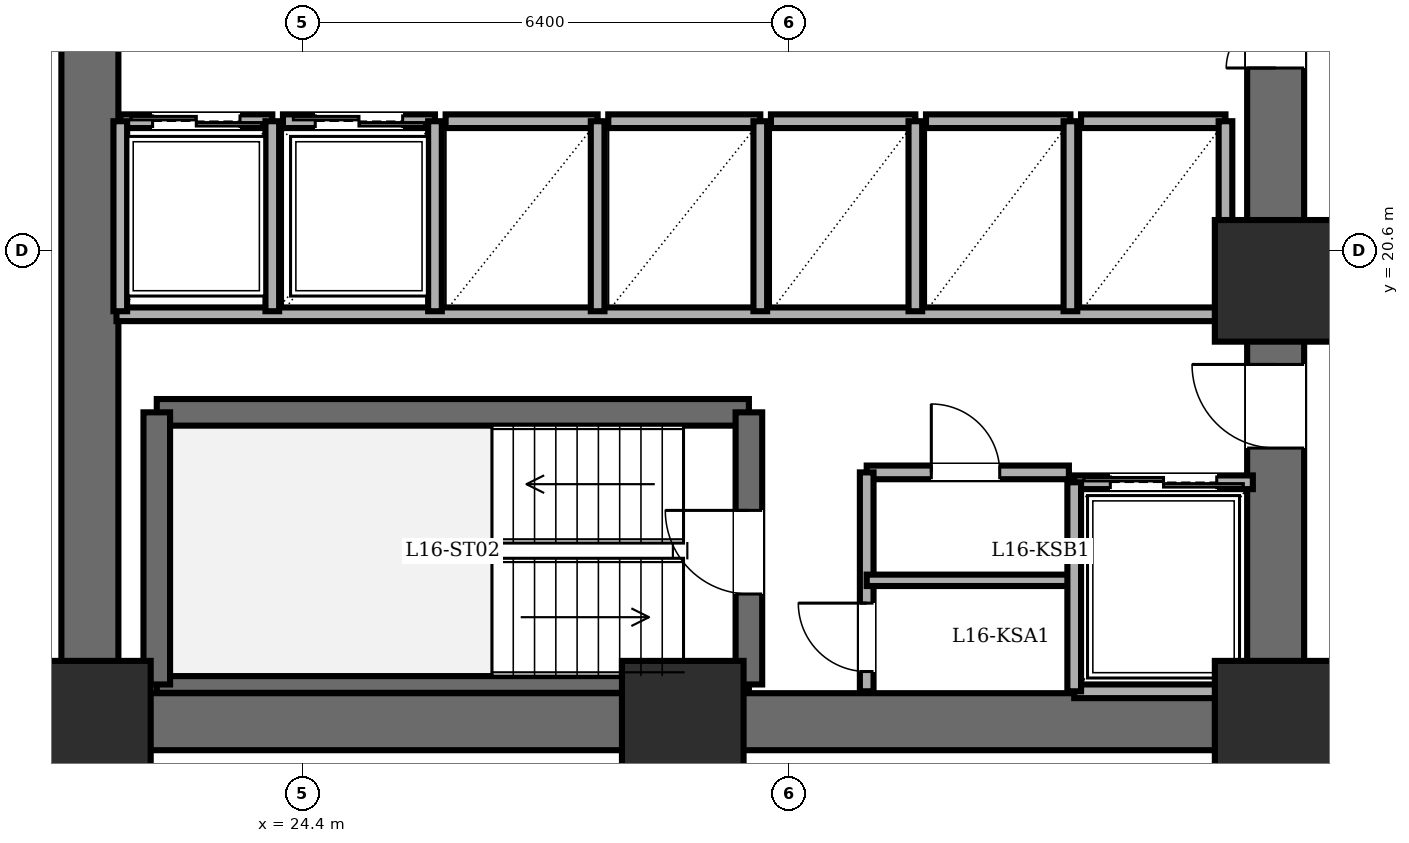
"""IFC4 building model, lengths in metres.
Left out: names, types, materials, properties, quantities, classifications, styles, units other than length and angle.
Written with IfcOpenShell. Run it as: python <this file> out.ifc"""

import sys

from ifc_helpers import new_model, si_unit, direction, frame, frame_2d, origin, origin_2d, place, context, subcontext, project, spatial, rectangle, extrude, element, fill, save


model = new_model("IFC4")
c1 = context("Model", 3, precision=1e-05, world=origin(), true_north=direction((0.0, 1.0)))
c2 = subcontext(c1, "Body", "Model", "MODEL_VIEW")
j1 = project(units=[si_unit("LENGTHUNIT", "METRE"), si_unit("PLANEANGLEUNIT", "RADIAN")], contexts=[c1])
p1 = place(None, origin())
s1 = spatial("IfcSite", under=j1, at=p1, CompositionType="ELEMENT")
p2 = place(p1, origin())
s2 = spatial("IfcBuilding", under=s1, at=p2, CompositionType="ELEMENT")
p3 = place(p2, frame((0.0, 0.0, 61.2)))
s3 = spatial("IfcBuildingStorey", under=s2, at=p3, CompositionType="ELEMENT", Elevation=61.2)
for number, where, z_axis, x_axis in (
    (1, (21.6, 14.4, 0.0), (0.0, 0.0, 1.0), (1.0, 0.0, 0.0)),
    (2, (29.4, 14.4, 0.0), (0.0, 0.0, 1.0), (1.0, 0.0, 0.0)),
    (3, (37.2, 14.4, 0.0), (0.0, 0.0, 1.0), (1.0, 0.0, 0.0)),
    (4, (37.2, 20.2, 0.0), (0.0, 0.0, 1.0), (1.0, 0.0, 0.0)),
):
    element("IfcColumn", number, at=place(p3, frame(where, z_axis=z_axis, x_axis=x_axis)), inside=s3, PredefinedType="COLUMN", context=c2, shape_type="SweptSolid", body=[
        extrude(rectangle(XDim=1.6, YDim=1.6, at=origin_2d()), origin(), (0.0, 0.0, 1.0), 3.6),
    ])
p4 = place(p3, frame((21.6, 14.4, 0.0), z_axis=(0.0, 0.0, 1.0), x_axis=(0.0, 1.0, 0.0)))
e5 = element("IfcWall", 5, at=p4, inside=s3, PredefinedType="SHEAR", context=c2, shape_type="SweptSolid", body=[
    extrude(rectangle(XDim=19.2, YDim=0.75, at=frame_2d((9.6, 0.0))), origin(), (0.0, 0.0, 1.0), 3.4),
])
p5 = place(p3, frame((37.2, 14.4, 0.0), z_axis=(0.0, 0.0, 1.0), x_axis=(-1.0, 0.0, 0.0)))
e6 = element("IfcWall", 6, at=p5, inside=s3, PredefinedType="SHEAR", context=c2, shape_type="SweptSolid", body=[
    extrude(rectangle(XDim=15.6, YDim=0.75, at=frame_2d((7.8, 0.0))), origin(), (0.0, 0.0, 1.0), 3.4),
])
p6 = place(p3, frame((37.2, 14.4, 0.0), z_axis=(0.0, 0.0, 1.0), x_axis=(0.0, 1.0, 0.0)))
e7 = element("IfcWall", 7, at=p6, inside=s3, PredefinedType="SHEAR", context=c2, shape_type="SweptSolid", body=[
    extrude(rectangle(XDim=19.2, YDim=0.75, at=frame_2d((9.6, 0.0))), origin(), (0.0, 0.0, 1.0), 3.4),
])
p7 = place(p6, frame((15.8, 0.0, 0.0)))
e8 = element("IfcOpeningElement", 8, at=p7, cuts=e7, PredefinedType="OPENING", context=c2, shape_type="SweptSolid", body=[
    extrude(rectangle(XDim=1.15, YDim=2.15, at=frame_2d((0.575, 1.075))), frame((0.0, 0.385, 0.0), z_axis=(0.0, -1.0, 0.0), x_axis=(1.0, 0.0, 0.0)), (0.0, 0.0, 1.0), 0.77),
])
p8 = place(p6, frame((3.6, 0.0, 0.0)))
e9 = element("IfcOpeningElement", 9, at=p8, cuts=e7, PredefinedType="OPENING", context=c2, shape_type="SweptSolid", body=[
    extrude(rectangle(XDim=1.1, YDim=2.15, at=frame_2d((0.55, 1.075))), frame((0.0, 0.385, 0.0), z_axis=(0.0, -1.0, 0.0), x_axis=(1.0, 0.0, 0.0)), (0.0, 0.0, 1.0), 0.77),
])
p9 = place(p6, frame((8.6, 0.0, 0.0)))
e10 = element("IfcOpeningElement", 10, at=p9, cuts=e7, PredefinedType="OPENING", context=c2, shape_type="SweptSolid", body=[
    extrude(rectangle(XDim=1.3, YDim=2.2, at=frame_2d((0.65, 1.1))), frame((0.0, 0.385, 0.0), z_axis=(0.0, -1.0, 0.0), x_axis=(1.0, 0.0, 0.0)), (0.0, 0.0, 1.0), 0.77),
])
p10 = place(p3, frame((22.48, 18.47, 0.0), z_axis=(0.0, 0.0, 1.0), x_axis=(1.0, 0.0, 0.0)))
e11 = element("IfcWall", 11, at=p10, inside=s3, PredefinedType="SOLIDWALL", context=c2, shape_type="SweptSolid", body=[
    extrude(rectangle(XDim=7.79, YDim=0.35, at=frame_2d((3.895, 0.0))), origin(), (0.0, 0.0, 1.0), 3.4),
])
p11 = place(p3, frame((22.48, 14.89, 0.0), z_axis=(0.0, 0.0, 1.0), x_axis=(1.0, 0.0, 0.0)))
e12 = element("IfcWall", 12, at=p11, inside=s3, PredefinedType="PARTITIONING", context=c2, shape_type="SweptSolid", body=[
    extrude(rectangle(XDim=7.79, YDim=0.22, at=frame_2d((3.895, 0.0))), origin(), (0.0, 0.0, 1.0), 3.4),
])
p12 = place(p3, frame((22.48, 14.89, 0.0), z_axis=(0.0, 0.0, 1.0), x_axis=(0.0, 1.0, 0.0)))
e13 = element("IfcWall", 13, at=p12, inside=s3, PredefinedType="SOLIDWALL", context=c2, shape_type="SweptSolid", body=[
    extrude(rectangle(XDim=3.58, YDim=0.35, at=frame_2d((1.79, 0.0))), origin(), (0.0, 0.0, 1.0), 3.4),
])
p13 = place(p3, frame((30.27, 14.89, 0.0), z_axis=(0.0, 0.0, 1.0), x_axis=(0.0, 1.0, 0.0)))
e14 = element("IfcWall", 14, at=p13, inside=s3, PredefinedType="SOLIDWALL", context=c2, shape_type="SweptSolid", body=[
    extrude(rectangle(XDim=3.58, YDim=0.35, at=frame_2d((1.79, 0.0))), origin(), (0.0, 0.0, 1.0), 3.4),
])
p14 = place(p13, frame((1.19, 0.0, 0.0)))
e15 = element("IfcOpeningElement", 15, at=p14, cuts=e14, PredefinedType="OPENING", context=c2, shape_type="SweptSolid", body=[
    extrude(rectangle(XDim=1.1, YDim=2.15, at=frame_2d((0.55, 1.075))), frame((0.0, 0.185, 0.0), z_axis=(0.0, -1.0, 0.0), x_axis=(1.0, 0.0, 0.0)), (0.0, 0.0, 1.0), 0.37),
])
p15 = place(p3, frame((21.95, 19.76, 0.0), z_axis=(0.0, 0.0, 1.0), x_axis=(1.0, 0.0, 0.0)))
e16 = element("IfcWall", 16, at=p15, inside=s3, PredefinedType="PARTITIONING", context=c2, shape_type="SweptSolid", body=[
    extrude(rectangle(XDim=14.87, YDim=0.18, at=frame_2d((7.435, 0.0))), origin(), (0.0, 0.0, 1.0), 3.4),
])
p16 = place(p3, frame((31.82, 17.68, 0.0), z_axis=(0.0, 0.0, 1.0), x_axis=(1.0, 0.0, 0.0)))
e17 = element("IfcWall", 17, at=p16, inside=s3, PredefinedType="PARTITIONING", context=c2, shape_type="SweptSolid", body=[
    extrude(rectangle(XDim=2.66, YDim=0.18, at=frame_2d((1.33, 0.0))), origin(), (0.0, 0.0, 1.0), 3.4),
])
p17 = place(p16, frame((0.85, 0.0, 0.0)))
e18 = element("IfcOpeningElement", 18, at=p17, cuts=e17, PredefinedType="OPENING", context=c2, shape_type="SweptSolid", body=[
    extrude(rectangle(XDim=0.9, YDim=2.05, at=frame_2d((0.45, 1.025))), frame((0.0, 0.1, 0.0), z_axis=(0.0, -1.0, 0.0), x_axis=(1.0, 0.0, 0.0)), (0.0, 0.0, 1.0), 0.2),
])
p18 = place(p3, frame((31.82, 14.8, 0.0), z_axis=(0.0, 0.0, 1.0), x_axis=(0.0, 1.0, 0.0)))
e19 = element("IfcWall", 19, at=p18, inside=s3, PredefinedType="PARTITIONING", context=c2, shape_type="SweptSolid", body=[
    extrude(rectangle(XDim=2.88, YDim=0.18, at=frame_2d((1.44, 0.0))), origin(), (0.0, 0.0, 1.0), 3.4),
])
p19 = place(p18, frame((0.26, 0.0, 0.0)))
e20 = element("IfcOpeningElement", 20, at=p19, cuts=e19, PredefinedType="OPENING", context=c2, shape_type="SweptSolid", body=[
    extrude(rectangle(XDim=0.9, YDim=2.05, at=frame_2d((0.45, 1.025))), frame((0.0, 0.1, 0.0), z_axis=(0.0, -1.0, 0.0), x_axis=(1.0, 0.0, 0.0)), (0.0, 0.0, 1.0), 0.2),
])
p20 = place(p3, frame((31.82, 16.26, 0.0), z_axis=(0.0, 0.0, 1.0), x_axis=(1.0, 0.0, 0.0)))
e21 = element("IfcWall", 21, at=p20, inside=s3, PredefinedType="PARTITIONING", context=c2, shape_type="SweptSolid", body=[
    extrude(rectangle(XDim=2.66, YDim=0.15, at=frame_2d((1.33, 0.0))), origin(), (0.0, 0.0, 1.0), 3.4),
])
p21 = place(p3, frame((34.55, 17.55, 0.0), z_axis=(0.0, 0.0, 1.0), x_axis=(1.0, 0.0, 0.0)))
e22 = element("IfcWall", 22, at=p21, inside=s3, PredefinedType="PARTITIONING", context=c2, shape_type="SweptSolid", body=[
    extrude(rectangle(XDim=2.35, YDim=0.18, at=frame_2d((1.175, 0.0))), origin(), (0.0, 0.0, 1.0), 3.4),
])
p22 = place(p21, frame((0.475, 0.0, 0.0)))
e23 = element("IfcOpeningElement", 23, at=p22, cuts=e22, PredefinedType="OPENING", context=c2, shape_type="SweptSolid", body=[
    extrude(rectangle(XDim=1.4, YDim=2.3, at=frame_2d((0.7, 1.15))), frame((0.0, 0.1, 0.0), z_axis=(0.0, -1.0, 0.0), x_axis=(1.0, 0.0, 0.0)), (0.0, 0.0, 1.0), 0.2),
])
p23 = place(p3, frame((36.9, 14.8, 0.0), z_axis=(0.0, 0.0, 1.0), x_axis=(-1.0, 0.0, 0.0)))
e24 = element("IfcWall", 24, at=p23, inside=s3, PredefinedType="PARTITIONING", context=c2, shape_type="SweptSolid", body=[
    extrude(rectangle(XDim=2.35, YDim=0.18, at=frame_2d((1.175, 0.0))), origin(), (0.0, 0.0, 1.0), 3.4),
])
p24 = place(p3, frame((34.55, 17.55, 0.0), z_axis=(0.0, 0.0, 1.0), x_axis=(0.0, -1.0, 0.0)))
e25 = element("IfcWall", 25, at=p24, inside=s3, PredefinedType="PARTITIONING", context=c2, shape_type="SweptSolid", body=[
    extrude(rectangle(XDim=2.75, YDim=0.18, at=frame_2d((1.375, 0.0))), origin(), (0.0, 0.0, 1.0), 3.4),
])
p25 = place(p3, frame((22.0, 22.3, 0.0), z_axis=(0.0, 0.0, 1.0), x_axis=(1.0, 0.0, 0.0)))
e26 = element("IfcWall", 26, at=p25, inside=s3, PredefinedType="PARTITIONING", context=c2, shape_type="SweptSolid", body=[
    extrude(rectangle(XDim=2.0, YDim=0.18, at=frame_2d((1.0, 0.0))), origin(), (0.0, 0.0, 1.0), 3.4),
])
p26 = place(p25, frame((0.425, 0.0, 0.0)))
e27 = element("IfcOpeningElement", 27, at=p26, cuts=e26, PredefinedType="OPENING", context=c2, shape_type="SweptSolid", body=[
    extrude(rectangle(XDim=1.15, YDim=2.2, at=frame_2d((0.575, 1.1))), frame((0.0, 0.1, 0.0), z_axis=(0.0, -1.0, 0.0), x_axis=(1.0, 0.0, 0.0)), (0.0, 0.0, 1.0), 0.2),
])
for number, where, z_axis, x_axis in (
    (28, (24.0, 19.8, 0.0), (0.0, 0.0, 1.0), (0.0, 1.0, 0.0)),
    (29, (22.0, 22.3, 0.0), (0.0, 0.0, 1.0), (0.0, -1.0, 0.0)),
):
    element("IfcWall", number, at=place(p3, frame(where, z_axis=z_axis, x_axis=x_axis)), inside=s3, PredefinedType="PARTITIONING", context=c2, shape_type="SweptSolid", body=[
        extrude(rectangle(XDim=2.5, YDim=0.18, at=frame_2d((1.25, 0.0))), origin(), (0.0, 0.0, 1.0), 3.4),
    ])
p27 = place(p3, frame((24.14, 22.3, 0.0), z_axis=(0.0, 0.0, 1.0), x_axis=(1.0, 0.0, 0.0)))
e30 = element("IfcWall", 30, at=p27, inside=s3, PredefinedType="PARTITIONING", context=c2, shape_type="SweptSolid", body=[
    extrude(rectangle(XDim=2.0, YDim=0.18, at=frame_2d((1.0, 0.0))), origin(), (0.0, 0.0, 1.0), 3.4),
])
p28 = place(p27, frame((0.425, 0.0, 0.0)))
e31 = element("IfcOpeningElement", 31, at=p28, cuts=e30, PredefinedType="OPENING", context=c2, shape_type="SweptSolid", body=[
    extrude(rectangle(XDim=1.15, YDim=2.2, at=frame_2d((0.575, 1.1))), frame((0.0, 0.1, 0.0), z_axis=(0.0, -1.0, 0.0), x_axis=(1.0, 0.0, 0.0)), (0.0, 0.0, 1.0), 0.2),
])
p29 = place(p3, frame((26.14, 19.8, 0.0), z_axis=(0.0, 0.0, 1.0), x_axis=(0.0, 1.0, 0.0)))
e32 = element("IfcWall", 32, at=p29, inside=s3, PredefinedType="PARTITIONING", context=c2, shape_type="SweptSolid", body=[
    extrude(rectangle(XDim=2.5, YDim=0.18, at=frame_2d((1.25, 0.0))), origin(), (0.0, 0.0, 1.0), 3.4),
])
p30 = place(p3, frame((26.28, 22.3, 0.0), z_axis=(0.0, 0.0, 1.0), x_axis=(1.0, 0.0, 0.0)))
e33 = element("IfcWall", 33, at=p30, inside=s3, PredefinedType="PARTITIONING", context=c2, shape_type="SweptSolid", body=[
    extrude(rectangle(XDim=2.0, YDim=0.18, at=frame_2d((1.0, 0.0))), origin(), (0.0, 0.0, 1.0), 3.4),
])
p31 = place(p3, frame((28.28, 19.8, 0.0), z_axis=(0.0, 0.0, 1.0), x_axis=(0.0, 1.0, 0.0)))
e34 = element("IfcWall", 34, at=p31, inside=s3, PredefinedType="PARTITIONING", context=c2, shape_type="SweptSolid", body=[
    extrude(rectangle(XDim=2.5, YDim=0.18, at=frame_2d((1.25, 0.0))), origin(), (0.0, 0.0, 1.0), 3.4),
])
p32 = place(p3, frame((28.42, 22.3, 0.0), z_axis=(0.0, 0.0, 1.0), x_axis=(1.0, 0.0, 0.0)))
e35 = element("IfcWall", 35, at=p32, inside=s3, PredefinedType="PARTITIONING", context=c2, shape_type="SweptSolid", body=[
    extrude(rectangle(XDim=2.0, YDim=0.18, at=frame_2d((1.0, 0.0))), origin(), (0.0, 0.0, 1.0), 3.4),
])
p33 = place(p3, frame((30.42, 19.8, 0.0), z_axis=(0.0, 0.0, 1.0), x_axis=(0.0, 1.0, 0.0)))
e36 = element("IfcWall", 36, at=p33, inside=s3, PredefinedType="PARTITIONING", context=c2, shape_type="SweptSolid", body=[
    extrude(rectangle(XDim=2.5, YDim=0.18, at=frame_2d((1.25, 0.0))), origin(), (0.0, 0.0, 1.0), 3.4),
])
p34 = place(p3, frame((30.56, 22.3, 0.0), z_axis=(0.0, 0.0, 1.0), x_axis=(1.0, 0.0, 0.0)))
e37 = element("IfcWall", 37, at=p34, inside=s3, PredefinedType="PARTITIONING", context=c2, shape_type="SweptSolid", body=[
    extrude(rectangle(XDim=1.9, YDim=0.18, at=frame_2d((0.95, 0.0))), origin(), (0.0, 0.0, 1.0), 3.4),
])
p35 = place(p3, frame((32.46, 19.8, 0.0), z_axis=(0.0, 0.0, 1.0), x_axis=(0.0, 1.0, 0.0)))
e38 = element("IfcWall", 38, at=p35, inside=s3, PredefinedType="PARTITIONING", context=c2, shape_type="SweptSolid", body=[
    extrude(rectangle(XDim=2.5, YDim=0.18, at=frame_2d((1.25, 0.0))), origin(), (0.0, 0.0, 1.0), 3.4),
])
p36 = place(p3, frame((32.6, 22.3, 0.0), z_axis=(0.0, 0.0, 1.0), x_axis=(1.0, 0.0, 0.0)))
e39 = element("IfcWall", 39, at=p36, inside=s3, PredefinedType="PARTITIONING", context=c2, shape_type="SweptSolid", body=[
    extrude(rectangle(XDim=1.9, YDim=0.18, at=frame_2d((0.95, 0.0))), origin(), (0.0, 0.0, 1.0), 3.4),
])
p37 = place(p3, frame((34.5, 19.8, 0.0), z_axis=(0.0, 0.0, 1.0), x_axis=(0.0, 1.0, 0.0)))
e40 = element("IfcWall", 40, at=p37, inside=s3, PredefinedType="PARTITIONING", context=c2, shape_type="SweptSolid", body=[
    extrude(rectangle(XDim=2.5, YDim=0.18, at=frame_2d((1.25, 0.0))), origin(), (0.0, 0.0, 1.0), 3.4),
])
p38 = place(p3, frame((34.64, 22.3, 0.0), z_axis=(0.0, 0.0, 1.0), x_axis=(1.0, 0.0, 0.0)))
e41 = element("IfcWall", 41, at=p38, inside=s3, PredefinedType="PARTITIONING", context=c2, shape_type="SweptSolid", body=[
    extrude(rectangle(XDim=1.9, YDim=0.18, at=frame_2d((0.95, 0.0))), origin(), (0.0, 0.0, 1.0), 3.4),
])
p39 = place(p3, frame((36.54, 19.8, 0.0), z_axis=(0.0, 0.0, 1.0), x_axis=(0.0, 1.0, 0.0)))
e42 = element("IfcWall", 42, at=p39, inside=s3, PredefinedType="PARTITIONING", context=c2, shape_type="SweptSolid", body=[
    extrude(rectangle(XDim=2.5, YDim=0.18, at=frame_2d((1.25, 0.0))), origin(), (0.0, 0.0, 1.0), 3.4),
])
p40 = place(p3, frame((3.4, 14.18, 0.0), z_axis=(0.0, 0.0, 1.0), x_axis=(1.0, 0.0, 0.0)))
e43 = element("IfcWall", 43, at=p40, inside=s3, PredefinedType="PARTITIONING", context=c2, shape_type="SweptSolid", body=[
    extrude(rectangle(XDim=18.08, YDim=0.22, at=frame_2d((9.04, 0.0))), origin(), (0.0, 0.0, 1.0), 3.4),
])
p41 = place(p40, frame((9.62, 0.0, 0.0)))
e44 = element("IfcOpeningElement", 44, at=p41, cuts=e43, PredefinedType="OPENING", context=c2, shape_type="SweptSolid", body=[
    extrude(rectangle(XDim=0.92, YDim=2.1, at=frame_2d((0.46, 1.05))), frame((0.0, 0.12, 0.0), z_axis=(0.0, -1.0, 0.0), x_axis=(1.0, 0.0, 0.0)), (0.0, 0.0, 1.0), 0.24),
])
p42 = place(p14, origin())
e45 = element("IfcDoor", 45, at=p42, inside=s3, OperationType="SINGLE_SWING_RIGHT", PredefinedType="DOOR", context=c2, shape_type="SweptSolid", body=[
    extrude(rectangle(XDim=1.1, YDim=2.15, at=frame_2d((0.55, 1.075))), frame((0.0, 0.025, 0.0), z_axis=(0.0, -1.0, 0.0), x_axis=(1.0, 0.0, 0.0)), (0.0, 0.0, 1.0), 0.05),
])
fill(e15, e45)
p43 = place(p8, origin())
e46 = element("IfcDoor", 46, at=p43, inside=s3, OperationType="SINGLE_SWING_RIGHT", PredefinedType="DOOR", context=c2, shape_type="SweptSolid", body=[
    extrude(rectangle(XDim=1.1, YDim=2.15, at=frame_2d((0.55, 1.075))), frame((0.0, 0.025, 0.0), z_axis=(0.0, -1.0, 0.0), x_axis=(1.0, 0.0, 0.0)), (0.0, 0.0, 1.0), 0.05),
])
fill(e9, e46)
p44 = place(p17, origin())
e47 = element("IfcDoor", 47, at=p44, inside=s3, OperationType="SINGLE_SWING_LEFT", PredefinedType="DOOR", context=c2, shape_type="SweptSolid", body=[
    extrude(rectangle(XDim=0.9, YDim=2.05, at=frame_2d((0.45, 1.025))), frame((0.0, 0.025, 0.0), z_axis=(0.0, -1.0, 0.0), x_axis=(1.0, 0.0, 0.0)), (0.0, 0.0, 1.0), 0.05),
])
fill(e18, e47)
p45 = place(p19, origin())
e48 = element("IfcDoor", 48, at=p45, inside=s3, OperationType="SINGLE_SWING_RIGHT", PredefinedType="DOOR", context=c2, shape_type="SweptSolid", body=[
    extrude(rectangle(XDim=0.9, YDim=2.05, at=frame_2d((0.45, 1.025))), frame((0.0, 0.025, 0.0), z_axis=(0.0, -1.0, 0.0), x_axis=(1.0, 0.0, 0.0)), (0.0, 0.0, 1.0), 0.05),
])
fill(e20, e48)
p46 = place(p22, origin())
e49 = element("IfcDoor", 49, at=p46, inside=s3, OperationType="DOUBLE_DOOR_SLIDING", PredefinedType="DOOR", context=c2, shape_type="SweptSolid", body=[
    extrude(rectangle(XDim=1.4, YDim=2.3, at=frame_2d((0.7, 1.15))), frame((0.0, 0.025, 0.0), z_axis=(0.0, -1.0, 0.0), x_axis=(1.0, 0.0, 0.0)), (0.0, 0.0, 1.0), 0.05),
])
fill(e23, e49)
p47 = place(p26, origin())
e50 = element("IfcDoor", 50, at=p47, inside=s3, OperationType="DOUBLE_DOOR_SLIDING", PredefinedType="DOOR", context=c2, shape_type="SweptSolid", body=[
    extrude(rectangle(XDim=1.15, YDim=2.2, at=frame_2d((0.575, 1.1))), frame((0.0, 0.025, 0.0), z_axis=(0.0, -1.0, 0.0), x_axis=(1.0, 0.0, 0.0)), (0.0, 0.0, 1.0), 0.05),
])
fill(e27, e50)
p48 = place(p28, origin())
e51 = element("IfcDoor", 51, at=p48, inside=s3, OperationType="DOUBLE_DOOR_SLIDING", PredefinedType="DOOR", context=c2, shape_type="SweptSolid", body=[
    extrude(rectangle(XDim=1.15, YDim=2.2, at=frame_2d((0.575, 1.1))), frame((0.0, 0.025, 0.0), z_axis=(0.0, -1.0, 0.0), x_axis=(1.0, 0.0, 0.0)), (0.0, 0.0, 1.0), 0.05),
])
fill(e31, e51)
p49 = place(p9, origin())
e52 = element("IfcDoor", 52, at=p49, inside=s3, OperationType="DOUBLE_DOOR_SINGLE_SWING", PredefinedType="DOOR", context=c2, shape_type="SweptSolid", body=[
    extrude(rectangle(XDim=1.3, YDim=2.2, at=frame_2d((0.65, 1.1))), frame((0.0, 0.025, 0.0), z_axis=(0.0, -1.0, 0.0), x_axis=(1.0, 0.0, 0.0)), (0.0, 0.0, 1.0), 0.05),
])
fill(e10, e52)
save(model, sys.argv[1])
